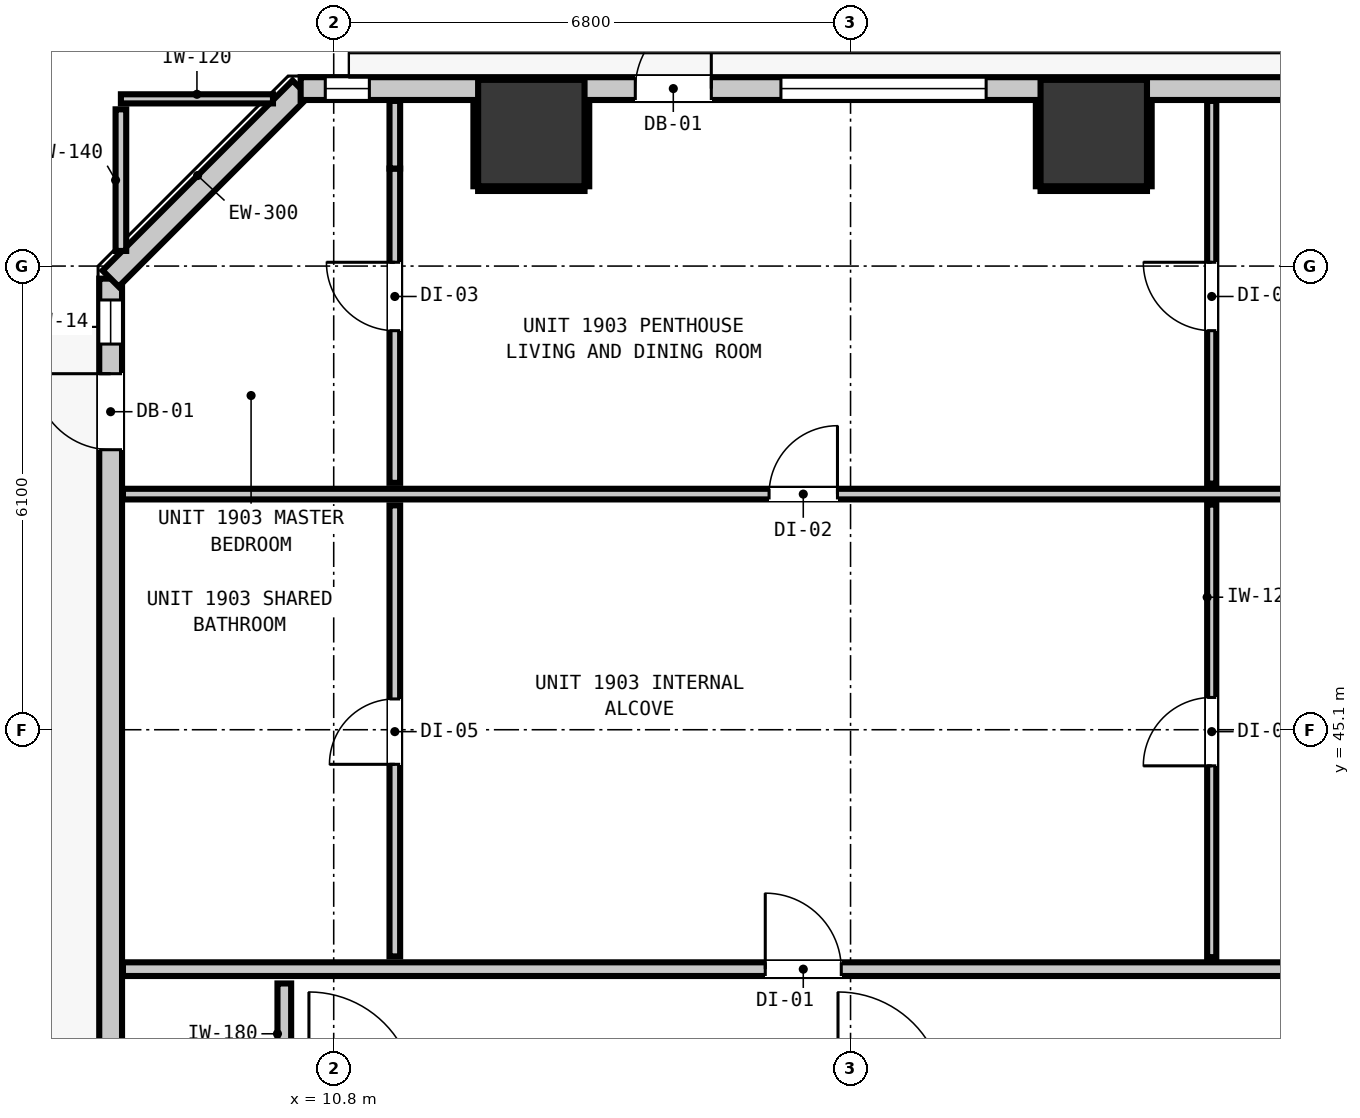
"""IFC4 building model, lengths in metres.
Left out: names, types, materials, properties, quantities, classifications, styles, units other than length and angle.
Written with IfcOpenShell. Run it as: python <this file> out.ifc"""

import sys

from ifc_helpers import new_model, si_unit, direction, frame, frame_2d, origin, origin_2d, place, context, subcontext, project, spatial, rectangle, extrude, element, fill, save


model = new_model("IFC4")
c1 = context("Model", 3, precision=1e-05, world=origin(), true_north=direction((0.0, 1.0)))
c2 = subcontext(c1, "Body", "Model", "MODEL_VIEW")
j1 = project(units=[si_unit("LENGTHUNIT", "METRE"), si_unit("PLANEANGLEUNIT", "RADIAN")], contexts=[c1])
p1 = place(None, origin())
s1 = spatial("IfcSite", under=j1, at=p1, CompositionType="ELEMENT")
p2 = place(p1, origin())
s2 = spatial("IfcBuilding", under=s1, at=p2, CompositionType="ELEMENT")
p3 = place(p2, frame((0.0, 0.0, 68.48)))
s3 = spatial("IfcBuildingStorey", under=s2, at=p3, CompositionType="ELEMENT", Elevation=68.48)
for number, where, z_axis, x_axis in (
    (1, (13.4, 52.95, 0.0), (0.0, 0.0, 1.0), (1.0, 0.0, 0.0)),
    (2, (20.8, 52.95, 0.0), (0.0, 0.0, 1.0), (1.0, 0.0, 0.0)),
):
    element("IfcColumn", number, at=place(p3, frame(where, z_axis=z_axis, x_axis=x_axis)), inside=s3, PredefinedType="COLUMN", context=c2, shape_type="SweptSolid", body=[
        extrude(rectangle(XDim=1.4, YDim=1.4, at=origin_2d()), origin(), (0.0, 0.0, 1.0), 3.32),
    ])
p4 = place(p3, frame((7.865, 16.365, 0.0), z_axis=(0.0, 0.0, 1.0), x_axis=(0.0, 1.0, 0.0)))
e3 = element("IfcWall", 3, at=p4, inside=s3, PredefinedType="STANDARD", context=c2, shape_type="SweptSolid", body=[
    extrude(rectangle(XDim=34.67, YDim=0.3, at=frame_2d((17.335, 0.0))), origin(), (0.0, 0.0, 1.0), 3.06),
])
p5 = place(p4, frame((32.419, 0.0, 0.0)))
e4 = element("IfcOpeningElement", 4, at=p5, cuts=e3, PredefinedType="OPENING", context=c2, shape_type="SweptSolid", body=[
    extrude(rectangle(XDim=1.0, YDim=2.15, at=frame_2d((0.5, 1.075))), frame((0.0, 0.16, 0.0), z_axis=(0.0, -1.0, 0.0), x_axis=(1.0, 0.0, 0.0)), (0.0, 0.0, 1.0), 0.32),
])
p6 = place(p4, frame((33.809, 0.0, 0.85)))
e5 = element("IfcOpeningElement", 5, at=p6, cuts=e3, PredefinedType="OPENING", context=c2, shape_type="SweptSolid", body=[
    extrude(rectangle(XDim=0.58, YDim=1.5, at=frame_2d((0.29, 0.75))), frame((0.0, 0.16, 0.0), z_axis=(0.0, -1.0, 0.0), x_axis=(1.0, 0.0, 0.0)), (0.0, 0.0, 1.0), 0.32),
])
p7 = place(p3, frame((7.865, 51.035, 0.0), z_axis=(0.0, 0.0, 1.0), x_axis=(0.707106781187, 0.707106781187, 0.0)))
e6 = element("IfcWall", 6, at=p7, inside=s3, PredefinedType="STANDARD", context=c2, shape_type="SweptSolid", body=[
    extrude(rectangle(XDim=3.536, YDim=0.3, at=frame_2d((1.768, 0.0))), origin(), (0.0, 0.0, 1.0), 3.06),
])
p8 = place(p3, frame((10.365, 53.535, 0.0), z_axis=(0.0, 0.0, 1.0), x_axis=(1.0, 0.0, 0.0)))
e7 = element("IfcWall", 7, at=p8, inside=s3, PredefinedType="STANDARD", context=c2, shape_type="SweptSolid", body=[
    extrude(rectangle(XDim=37.47, YDim=0.3, at=frame_2d((18.735, 0.0))), origin(), (0.0, 0.0, 1.0), 3.06),
])
p9 = place(p8, frame((4.403, 0.0, 0.0)))
e8 = element("IfcOpeningElement", 8, at=p9, cuts=e7, PredefinedType="OPENING", context=c2, shape_type="SweptSolid", body=[
    extrude(rectangle(XDim=1.0, YDim=2.15, at=frame_2d((0.5, 1.075))), frame((0.0, 0.16, 0.0), z_axis=(0.0, -1.0, 0.0), x_axis=(1.0, 0.0, 0.0)), (0.0, 0.0, 1.0), 0.32),
])
p10 = place(p8, frame((6.319, 0.0, 0.85)))
e9 = element("IfcOpeningElement", 9, at=p10, cuts=e7, PredefinedType="OPENING", context=c2, shape_type="SweptSolid", body=[
    extrude(rectangle(XDim=2.7, YDim=2.0, at=frame_2d((1.35, 1.0))), frame((0.0, 0.16, 0.0), z_axis=(0.0, -1.0, 0.0), x_axis=(1.0, 0.0, 0.0)), (0.0, 0.0, 1.0), 0.32),
])
p11 = place(p8, frame((0.324, 0.0, 0.85)))
e10 = element("IfcOpeningElement", 10, at=p11, cuts=e7, PredefinedType="OPENING", context=c2, shape_type="SweptSolid", body=[
    extrude(rectangle(XDim=0.58, YDim=1.5, at=frame_2d((0.29, 0.75))), frame((0.0, 0.16, 0.0), z_axis=(0.0, -1.0, 0.0), x_axis=(1.0, 0.0, 0.0)), (0.0, 0.0, 1.0), 0.32),
])
p12 = place(p8, frame((13.221, 0.0, 0.85)))
e11 = element("IfcOpeningElement", 11, at=p12, cuts=e7, PredefinedType="OPENING", context=c2, shape_type="SweptSolid", body=[
    extrude(rectangle(XDim=2.7, YDim=2.0, at=frame_2d((1.35, 1.0))), frame((0.0, 0.16, 0.0), z_axis=(0.0, -1.0, 0.0), x_axis=(1.0, 0.0, 0.0)), (0.0, 0.0, 1.0), 0.32),
])
p13 = place(p8, frame((21.797, 0.0, 0.85)))
e12 = element("IfcOpeningElement", 12, at=p13, cuts=e7, PredefinedType="OPENING", context=c2, shape_type="SweptSolid", body=[
    extrude(rectangle(XDim=2.7, YDim=2.0, at=frame_2d((1.35, 1.0))), frame((0.0, 0.16, 0.0), z_axis=(0.0, -1.0, 0.0), x_axis=(1.0, 0.0, 0.0)), (0.0, 0.0, 1.0), 0.32),
])
p14 = place(p8, frame((19.807, 0.0, 0.85)))
e13 = element("IfcOpeningElement", 13, at=p14, cuts=e7, PredefinedType="OPENING", context=c2, shape_type="SweptSolid", body=[
    extrude(rectangle(XDim=0.58, YDim=1.5, at=frame_2d((0.29, 0.75))), frame((0.0, 0.16, 0.0), z_axis=(0.0, -1.0, 0.0), x_axis=(1.0, 0.0, 0.0)), (0.0, 0.0, 1.0), 0.32),
])
p15 = place(p8, frame((29.395, 0.0, 0.85)))
e14 = element("IfcOpeningElement", 14, at=p15, cuts=e7, PredefinedType="OPENING", context=c2, shape_type="SweptSolid", body=[
    extrude(rectangle(XDim=2.7, YDim=2.0, at=frame_2d((1.35, 1.0))), frame((0.0, 0.16, 0.0), z_axis=(0.0, -1.0, 0.0), x_axis=(1.0, 0.0, 0.0)), (0.0, 0.0, 1.0), 0.32),
])
p16 = place(p8, frame((34.277, 0.0, 0.85)))
e15 = element("IfcOpeningElement", 15, at=p16, cuts=e7, PredefinedType="OPENING", context=c2, shape_type="SweptSolid", body=[
    extrude(rectangle(XDim=2.7, YDim=2.0, at=frame_2d((1.35, 1.0))), frame((0.0, 0.16, 0.0), z_axis=(0.0, -1.0, 0.0), x_axis=(1.0, 0.0, 0.0)), (0.0, 0.0, 1.0), 0.32),
])
p17 = place(p3, frame((8.027, 41.95, 0.0), z_axis=(0.0, 0.0, 1.0), x_axis=(1.0, 0.0, 0.0)))
e16 = element("IfcWall", 16, at=p17, inside=s3, PredefinedType="PARTITIONING", context=c2, shape_type="SweptSolid", body=[
    extrude(rectangle(XDim=42.146, YDim=0.18, at=frame_2d((21.073, 0.0))), origin(), (0.0, 0.0, 1.0), 3.06),
])
p18 = place(p17, frame((8.451, 0.0, 0.0)))
e17 = element("IfcOpeningElement", 17, at=p18, cuts=e16, PredefinedType="OPENING", context=c2, shape_type="SweptSolid", body=[
    extrude(rectangle(XDim=1.0, YDim=2.15, at=frame_2d((0.5, 1.075))), frame((0.0, 0.1, 0.0), z_axis=(0.0, -1.0, 0.0), x_axis=(1.0, 0.0, 0.0)), (0.0, 0.0, 1.0), 0.2),
])
p19 = place(p17, frame((26.075, 0.0, 0.0)))
e18 = element("IfcOpeningElement", 18, at=p19, cuts=e16, PredefinedType="OPENING", context=c2, shape_type="SweptSolid", body=[
    extrude(rectangle(XDim=1.0, YDim=2.15, at=frame_2d((0.5, 1.075))), frame((0.0, 0.1, 0.0), z_axis=(0.0, -1.0, 0.0), x_axis=(1.0, 0.0, 0.0)), (0.0, 0.0, 1.0), 0.2),
])
p20 = place(p3, frame((8.027, 48.2, 0.0), z_axis=(0.0, 0.0, 1.0), x_axis=(1.0, 0.0, 0.0)))
e19 = element("IfcWall", 19, at=p20, inside=s3, PredefinedType="PARTITIONING", context=c2, shape_type="SweptSolid", body=[
    extrude(rectangle(XDim=23.097, YDim=0.14, at=frame_2d((11.548, 0.0))), origin(), (0.0, 0.0, 1.0), 3.06),
])
p21 = place(p20, frame((8.501, 0.0, 0.0)))
e20 = element("IfcOpeningElement", 20, at=p21, cuts=e19, PredefinedType="OPENING", context=c2, shape_type="SweptSolid", body=[
    extrude(rectangle(XDim=0.9, YDim=2.1, at=frame_2d((0.45, 1.05))), frame((0.0, 0.08, 0.0), z_axis=(0.0, -1.0, 0.0), x_axis=(1.0, 0.0, 0.0)), (0.0, 0.0, 1.0), 0.16),
])
p22 = place(p3, frame((8.0, 53.4, 0.0), z_axis=(0.0, 0.0, 1.0), x_axis=(1.0, 0.0, 0.0)))
e21 = element("IfcWall", 21, at=p22, inside=s3, PredefinedType="PARTITIONING", context=c2, shape_type="SweptSolid", body=[
    extrude(rectangle(XDim=2.001, YDim=0.12, at=frame_2d((1.0, 0.0))), origin(), (0.0, 0.0, 1.0), 3.06),
])
p23 = place(p3, frame((10.15, 40.438, 0.0), z_axis=(0.0, 0.0, 1.0), x_axis=(0.0, 1.0, 0.0)))
e22 = element("IfcWall", 22, at=p23, inside=s3, PredefinedType="PARTITIONING", context=c2, shape_type="SweptSolid", body=[
    extrude(rectangle(XDim=1.324, YDim=0.18, at=frame_2d((0.662, 0.0))), origin(), (0.0, 0.0, 1.0), 3.06),
])
p24 = place(p3, frame((8.0, 51.399, 0.0), z_axis=(0.0, 0.0, 1.0), x_axis=(0.0, 1.0, 0.0)))
e23 = element("IfcWall", 23, at=p24, inside=s3, PredefinedType="PARTITIONING", context=c2, shape_type="SweptSolid", body=[
    extrude(rectangle(XDim=1.863, YDim=0.14, at=frame_2d((0.932, 0.0))), origin(), (0.0, 0.0, 1.0), 3.06),
])
p25 = place(p3, frame((11.604, 42.118, 0.0), z_axis=(0.0, 0.0, 1.0), x_axis=(0.0, 1.0, 0.0)))
e24 = element("IfcWall", 24, at=p25, inside=s3, PredefinedType="PARTITIONING", context=c2, shape_type="SweptSolid", body=[
    extrude(rectangle(XDim=5.934, YDim=0.14, at=frame_2d((2.967, 0.0))), origin(), (0.0, 0.0, 1.0), 2.445),
])
p26 = place(p25, frame((2.527, 0.0, 0.0)))
e25 = element("IfcOpeningElement", 25, at=p26, cuts=e24, PredefinedType="OPENING", context=c2, shape_type="SweptSolid", body=[
    extrude(rectangle(XDim=0.86, YDim=2.02, at=frame_2d((0.43, 1.01))), frame((0.0, 0.08, 0.0), z_axis=(0.0, -1.0, 0.0), x_axis=(1.0, 0.0, 0.0)), (0.0, 0.0, 1.0), 0.16),
])
p27 = place(p3, frame((11.604, 48.348, 0.0), z_axis=(0.0, 0.0, 1.0), x_axis=(0.0, 1.0, 0.0)))
e26 = element("IfcWall", 26, at=p27, inside=s3, PredefinedType="PARTITIONING", context=c2, shape_type="SweptSolid", body=[
    extrude(rectangle(XDim=4.135, YDim=0.14, at=frame_2d((2.067, 0.0))), origin(), (0.0, 0.0, 1.0), 2.445),
])
p28 = place(p27, frame((2.002, 0.0, 0.0)))
e27 = element("IfcOpeningElement", 27, at=p28, cuts=e26, PredefinedType="OPENING", context=c2, shape_type="SweptSolid", body=[
    extrude(rectangle(XDim=0.9, YDim=2.1, at=frame_2d((0.45, 1.05))), frame((0.0, 0.08, 0.0), z_axis=(0.0, -1.0, 0.0), x_axis=(1.0, 0.0, 0.0)), (0.0, 0.0, 1.0), 0.16),
])
p29 = place(p3, frame((11.604, 52.483, 0.0), z_axis=(0.0, 0.0, 1.0), x_axis=(0.0, 1.0, 0.0)))
e28 = element("IfcWall", 28, at=p29, inside=s3, PredefinedType="PARTITIONING", context=c2, shape_type="SweptSolid", body=[
    extrude(rectangle(XDim=0.89, YDim=0.14, at=frame_2d((0.445, 0.0))), origin(), (0.0, 0.0, 1.0), 3.06),
])
p30 = place(p3, frame((22.352, 42.108, 0.0), z_axis=(0.0, 0.0, 1.0), x_axis=(0.0, 1.0, 0.0)))
e29 = element("IfcWall", 29, at=p30, inside=s3, PredefinedType="PARTITIONING", context=c2, shape_type="SweptSolid", body=[
    extrude(rectangle(XDim=5.954, YDim=0.12, at=frame_2d((2.977, 0.0))), origin(), (0.0, 0.0, 1.0), 3.06),
])
p31 = place(p30, frame((2.517, 0.0, 0.0)))
e30 = element("IfcOpeningElement", 30, at=p31, cuts=e29, PredefinedType="OPENING", context=c2, shape_type="SweptSolid", body=[
    extrude(rectangle(XDim=0.9, YDim=2.1, at=frame_2d((0.45, 1.05))), frame((0.0, 0.07, 0.0), z_axis=(0.0, -1.0, 0.0), x_axis=(1.0, 0.0, 0.0)), (0.0, 0.0, 1.0), 0.14),
])
p32 = place(p3, frame((22.352, 48.338, 0.0), z_axis=(0.0, 0.0, 1.0), x_axis=(0.0, 1.0, 0.0)))
e31 = element("IfcWall", 31, at=p32, inside=s3, PredefinedType="PARTITIONING", context=c2, shape_type="SweptSolid", body=[
    extrude(rectangle(XDim=5.035, YDim=0.12, at=frame_2d((2.518, 0.0))), origin(), (0.0, 0.0, 1.0), 3.06),
])
p33 = place(p32, frame((2.012, 0.0, 0.0)))
e32 = element("IfcOpeningElement", 32, at=p33, cuts=e31, PredefinedType="OPENING", context=c2, shape_type="SweptSolid", body=[
    extrude(rectangle(XDim=0.9, YDim=2.1, at=frame_2d((0.45, 1.05))), frame((0.0, 0.07, 0.0), z_axis=(0.0, -1.0, 0.0), x_axis=(1.0, 0.0, 0.0)), (0.0, 0.0, 1.0), 0.14),
])
p34 = place(p3, frame((12.7, 52.218, 0.0), z_axis=(0.0, 0.0, 1.0), x_axis=(1.0, 0.0, 0.0)))
e33 = element("IfcWall", 33, at=p34, inside=s3, PredefinedType="PARTITIONING", context=c2, shape_type="SweptSolid", body=[
    extrude(rectangle(XDim=1.4, YDim=0.06, at=frame_2d((0.7, 0.0))), origin(), (0.0, 0.0, 1.0), 1.45),
])
for number, where, z_axis, x_axis in (
    (34, (12.668, 52.25, 0.0), (0.0, 0.0, 1.0), (0.0, 1.0, 0.0)),
    (35, (14.132, 52.25, 0.0), (0.0, 0.0, 1.0), (0.0, 1.0, 0.0)),
):
    element("IfcWall", number, at=place(p3, frame(where, z_axis=z_axis, x_axis=x_axis)), inside=s3, PredefinedType="PARTITIONING", context=c2, shape_type="SweptSolid", body=[
        extrude(rectangle(XDim=1.12, YDim=0.06, at=frame_2d((0.56, 0.0))), origin(), (0.0, 0.0, 1.0), 1.45),
    ])
p35 = place(p3, frame((20.1, 52.218, 0.0), z_axis=(0.0, 0.0, 1.0), x_axis=(1.0, 0.0, 0.0)))
e36 = element("IfcWall", 36, at=p35, inside=s3, PredefinedType="PARTITIONING", context=c2, shape_type="SweptSolid", body=[
    extrude(rectangle(XDim=1.4, YDim=0.06, at=frame_2d((0.7, 0.0))), origin(), (0.0, 0.0, 1.0), 1.45),
])
for number, where, z_axis, x_axis in (
    (37, (20.068, 52.25, 0.0), (0.0, 0.0, 1.0), (0.0, 1.0, 0.0)),
    (38, (21.532, 52.25, 0.0), (0.0, 0.0, 1.0), (0.0, 1.0, 0.0)),
):
    element("IfcWall", number, at=place(p3, frame(where, z_axis=z_axis, x_axis=x_axis)), inside=s3, PredefinedType="PARTITIONING", context=c2, shape_type="SweptSolid", body=[
        extrude(rectangle(XDim=1.12, YDim=0.06, at=frame_2d((0.56, 0.0))), origin(), (0.0, 0.0, 1.0), 1.45),
    ])
p36 = place(p9, origin())
e39 = element("IfcDoor", 39, at=p36, inside=s3, OperationType="SINGLE_SWING_RIGHT", PredefinedType="DOOR", context=c2, shape_type="SweptSolid", body=[
    extrude(rectangle(XDim=1.0, YDim=2.15, at=frame_2d((0.5, 1.075))), frame((0.0, 0.025, 0.0), z_axis=(0.0, -1.0, 0.0), x_axis=(1.0, 0.0, 0.0)), (0.0, 0.0, 1.0), 0.05),
])
fill(e8, e39)
p37 = place(p5, origin())
e40 = element("IfcDoor", 40, at=p37, inside=s3, OperationType="SINGLE_SWING_RIGHT", PredefinedType="DOOR", context=c2, shape_type="SweptSolid", body=[
    extrude(rectangle(XDim=1.0, YDim=2.15, at=frame_2d((0.5, 1.075))), frame((0.0, 0.025, 0.0), z_axis=(0.0, -1.0, 0.0), x_axis=(1.0, 0.0, 0.0)), (0.0, 0.0, 1.0), 0.05),
])
fill(e4, e40)
p38 = place(p6, origin())
e41 = element("IfcWindow", 41, at=p38, inside=s3, PartitioningType="SINGLE_PANEL", PredefinedType="WINDOW", context=c2, shape_type="SweptSolid", body=[
    extrude(rectangle(XDim=0.58, YDim=1.5, at=frame_2d((0.29, 0.75))), frame((0.0, 0.03, 0.0), z_axis=(0.0, -1.0, 0.0), x_axis=(1.0, 0.0, 0.0)), (0.0, 0.0, 1.0), 0.06),
])
fill(e5, e41)
p39 = place(p10, origin())
e42 = element("IfcWindow", 42, at=p39, inside=s3, PartitioningType="SINGLE_PANEL", PredefinedType="WINDOW", context=c2, shape_type="SweptSolid", body=[
    extrude(rectangle(XDim=2.7, YDim=2.0, at=frame_2d((1.35, 1.0))), frame((0.0, 0.03, 0.0), z_axis=(0.0, -1.0, 0.0), x_axis=(1.0, 0.0, 0.0)), (0.0, 0.0, 1.0), 0.06),
])
fill(e9, e42)
p40 = place(p11, origin())
e43 = element("IfcWindow", 43, at=p40, inside=s3, PartitioningType="SINGLE_PANEL", PredefinedType="WINDOW", context=c2, shape_type="SweptSolid", body=[
    extrude(rectangle(XDim=0.58, YDim=1.5, at=frame_2d((0.29, 0.75))), frame((0.0, 0.03, 0.0), z_axis=(0.0, -1.0, 0.0), x_axis=(1.0, 0.0, 0.0)), (0.0, 0.0, 1.0), 0.06),
])
fill(e10, e43)
p41 = place(p18, origin())
e44 = element("IfcDoor", 44, at=p41, inside=s3, OperationType="SINGLE_SWING_LEFT", PredefinedType="DOOR", context=c2, shape_type="SweptSolid", body=[
    extrude(rectangle(XDim=1.0, YDim=2.15, at=frame_2d((0.5, 1.075))), frame((0.0, 0.025, 0.0), z_axis=(0.0, -1.0, 0.0), x_axis=(1.0, 0.0, 0.0)), (0.0, 0.0, 1.0), 0.05),
])
fill(e17, e44)
p42 = place(p21, origin())
e45 = element("IfcDoor", 45, at=p42, inside=s3, OperationType="SINGLE_SWING_RIGHT", PredefinedType="DOOR", context=c2, shape_type="SweptSolid", body=[
    extrude(rectangle(XDim=0.9, YDim=2.1, at=frame_2d((0.45, 1.05))), frame((0.0, 0.025, 0.0), z_axis=(0.0, -1.0, 0.0), x_axis=(1.0, 0.0, 0.0)), (0.0, 0.0, 1.0), 0.05),
])
fill(e20, e45)
p43 = place(p26, origin())
e46 = element("IfcDoor", 46, at=p43, inside=s3, OperationType="SINGLE_SWING_LEFT", PredefinedType="DOOR", context=c2, shape_type="SweptSolid", body=[
    extrude(rectangle(XDim=0.86, YDim=2.02, at=frame_2d((0.43, 1.01))), frame((0.0, 0.025, 0.0), z_axis=(0.0, -1.0, 0.0), x_axis=(1.0, 0.0, 0.0)), (0.0, 0.0, 1.0), 0.05),
])
fill(e25, e46)
p44 = place(p28, origin())
e47 = element("IfcDoor", 47, at=p44, inside=s3, OperationType="SINGLE_SWING_RIGHT", PredefinedType="DOOR", context=c2, shape_type="SweptSolid", body=[
    extrude(rectangle(XDim=0.9, YDim=2.1, at=frame_2d((0.45, 1.05))), frame((0.0, 0.025, 0.0), z_axis=(0.0, -1.0, 0.0), x_axis=(1.0, 0.0, 0.0)), (0.0, 0.0, 1.0), 0.05),
])
fill(e27, e47)
p45 = place(p31, origin())
e48 = element("IfcDoor", 48, at=p45, inside=s3, OperationType="SINGLE_SWING_LEFT", PredefinedType="DOOR", context=c2, shape_type="SweptSolid", body=[
    extrude(rectangle(XDim=0.9, YDim=2.1, at=frame_2d((0.45, 1.05))), frame((0.0, 0.025, 0.0), z_axis=(0.0, -1.0, 0.0), x_axis=(1.0, 0.0, 0.0)), (0.0, 0.0, 1.0), 0.05),
])
fill(e30, e48)
p46 = place(p33, origin())
e49 = element("IfcDoor", 49, at=p46, inside=s3, OperationType="SINGLE_SWING_RIGHT", PredefinedType="DOOR", context=c2, shape_type="SweptSolid", body=[
    extrude(rectangle(XDim=0.9, YDim=2.1, at=frame_2d((0.45, 1.05))), frame((0.0, 0.025, 0.0), z_axis=(0.0, -1.0, 0.0), x_axis=(1.0, 0.0, 0.0)), (0.0, 0.0, 1.0), 0.05),
])
fill(e32, e49)
save(model, sys.argv[1])
